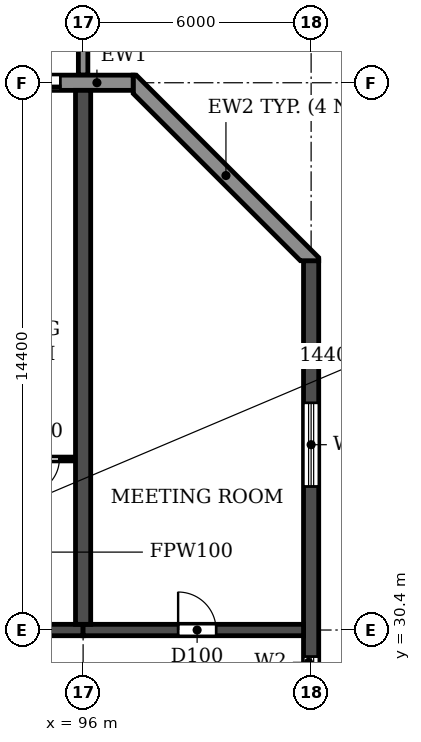
"""IFC4 building model, lengths in metres.
Left out: names, types, materials, properties, quantities, classifications, styles, units other than length and angle.
Written with IfcOpenShell. Run it as: python <this file> out.ifc"""

import sys

from ifc_helpers import new_model, si_unit, direction, frame, frame_2d, origin, place, context, subcontext, project, spatial, polyline, rectangle, outline, extrude, source, transform, mapped, element, fill, save


model = new_model("IFC4")
c1 = context("Model", 3, precision=1e-05, world=origin(), true_north=direction((0.0, 1.0)))
c2 = subcontext(c1, "Body", "Model", "MODEL_VIEW")
j1 = project(units=[si_unit("LENGTHUNIT", "METRE"), si_unit("PLANEANGLEUNIT", "RADIAN")], contexts=[c1])
p1 = place(None, origin())
s1 = spatial("IfcSite", under=j1, at=p1, CompositionType="ELEMENT")
p2 = place(p1, origin())
s2 = spatial("IfcBuilding", under=s1, at=p2, CompositionType="ELEMENT")
p3 = place(p2, frame((0.0, 0.0, 43.2)))
s3 = spatial("IfcBuildingStorey", under=s2, at=p3, CompositionType="ELEMENT", Elevation=43.2)
p4 = place(p3, frame((96.0, 30.55, 0.0), z_axis=(0.0, 0.0, 1.0), x_axis=(0.0, 1.0, 0.0)))
e1 = element("IfcWall", 1, at=p4, inside=s3, PredefinedType="SHEAR", context=c2, shape_type="SweptSolid", body=[
    extrude(rectangle(XDim=14.05, YDim=0.4, at=frame_2d((7.025, 0.0))), origin(), (0.0, 0.0, 1.0), 3.05),
])
p5 = place(p3, frame((102.0, 4.683, 0.0), z_axis=(0.0, 0.0, 1.0), x_axis=(0.0, 1.0, 0.0)))
e2 = element("IfcWall", 2, at=p5, inside=s3, PredefinedType="SHEAR", context=c2, shape_type="SweptSolid", body=[
    extrude(rectangle(XDim=35.434, YDim=0.4, at=frame_2d((17.717, 0.0))), origin(), (0.0, 0.0, 1.0), 3.05),
])
p6 = place(p5, frame((15.917, 0.0, 0.9)))
e3 = element("IfcOpeningElement", 3, at=p6, cuts=e2, PredefinedType="OPENING", context=c2, shape_type="SweptSolid", body=[
    extrude(rectangle(XDim=1.2, YDim=1.5, at=frame_2d((0.6, 0.75))), frame((0.0, 0.21, 0.0), z_axis=(0.0, -1.0, 0.0), x_axis=(1.0, 0.0, 0.0)), (0.0, 0.0, 1.0), 0.42),
])
p7 = place(p5, frame((23.817, 0.0, 0.9)))
e4 = element("IfcOpeningElement", 4, at=p7, cuts=e2, PredefinedType="OPENING", context=c2, shape_type="SweptSolid", body=[
    extrude(rectangle(XDim=1.2, YDim=1.5, at=frame_2d((0.6, 0.75))), frame((0.0, 0.21, 0.0), z_axis=(0.0, -1.0, 0.0), x_axis=(1.0, 0.0, 0.0)), (0.0, 0.0, 1.0), 0.42),
])
p8 = place(p5, frame((8.017, 0.0, 0.9)))
e5 = element("IfcOpeningElement", 5, at=p8, cuts=e2, PredefinedType="OPENING", context=c2, shape_type="SweptSolid", body=[
    extrude(rectangle(XDim=1.2, YDim=1.5, at=frame_2d((0.6, 0.75))), frame((0.0, 0.21, 0.0), z_axis=(0.0, -1.0, 0.0), x_axis=(1.0, 0.0, 0.0)), (0.0, 0.0, 1.0), 0.42),
])
p9 = place(p5, frame((29.493, 0.0, 0.6)))
e6 = element("IfcOpeningElement", 6, at=p9, cuts=e2, PredefinedType="OPENING", context=c2, shape_type="SweptSolid", body=[
    extrude(rectangle(XDim=2.2, YDim=1.8, at=frame_2d((1.1, 0.9))), frame((0.0, 0.21, 0.0), z_axis=(0.0, -1.0, 0.0), x_axis=(1.0, 0.0, 0.0)), (0.0, 0.0, 1.0), 0.42),
])
p10 = place(p5, frame((2.541, 0.0, 0.6)))
e7 = element("IfcOpeningElement", 7, at=p10, cuts=e2, PredefinedType="OPENING", context=c2, shape_type="SweptSolid", body=[
    extrude(rectangle(XDim=2.2, YDim=1.8, at=frame_2d((1.1, 0.9))), frame((0.0, 0.21, 0.0), z_axis=(0.0, -1.0, 0.0), x_axis=(1.0, 0.0, 0.0)), (0.0, 0.0, 1.0), 0.42),
])
p11 = place(p3, frame((90.0, 30.4, 0.0), z_axis=(0.0, 0.0, 1.0), x_axis=(1.0, 0.0, 0.0)))
e8 = element("IfcWall", 8, at=p11, inside=s3, PredefinedType="SHEAR", context=c2, shape_type="SweptSolid", body=[
    extrude(rectangle(XDim=6.0, YDim=0.3, at=frame_2d((3.0, 0.0))), origin(), (0.0, 0.0, 1.0), 2.45),
])
p12 = place(p11, frame((2.45, 0.0, 0.0)))
e9 = element("IfcOpeningElement", 9, at=p12, cuts=e8, PredefinedType="OPENING", context=c2, shape_type="SweptSolid", body=[
    extrude(rectangle(XDim=1.0, YDim=2.1, at=frame_2d((0.5, 1.05))), frame((0.0, 0.16, 0.0), z_axis=(0.0, -1.0, 0.0), x_axis=(1.0, 0.0, 0.0)), (0.0, 0.0, 1.0), 0.32),
])
p13 = place(p3, frame((96.0, 30.4, 0.0), z_axis=(0.0, 0.0, 1.0), x_axis=(1.0, 0.0, 0.0)))
e10 = element("IfcWall", 10, at=p13, inside=s3, PredefinedType="SHEAR", context=c2, shape_type="SweptSolid", body=[
    extrude(rectangle(XDim=5.8, YDim=0.3, at=frame_2d((2.9, 0.0))), origin(), (0.0, 0.0, 1.0), 2.45),
])
p14 = place(p13, frame((2.5, 0.0, 0.0)))
e11 = element("IfcOpeningElement", 11, at=p14, cuts=e10, PredefinedType="OPENING", context=c2, shape_type="SweptSolid", body=[
    extrude(rectangle(XDim=1.0, YDim=2.1, at=frame_2d((0.5, 1.05))), frame((0.0, 0.16, 0.0), z_axis=(0.0, -1.0, 0.0), x_axis=(1.0, 0.0, 0.0)), (0.0, 0.0, 1.0), 0.32),
])
p15 = place(p3, origin())
e12 = element("IfcWall", 12, at=p15, inside=s3, PredefinedType="STANDARD", context=c2, shape_type="SweptSolid", body=[
    extrude(outline(polyline([(102.2, 40.117), (102.2, 40.2), (97.4, 45.0), (97.317, 45.0), (97.317, 44.517), (101.717, 40.117), (102.2, 40.117)])), origin(), (0.0, 0.0, 1.0), 3.05),
])
p16 = place(p3, frame((97.317, 44.8, 0.0), z_axis=(0.0, 0.0, 1.0), x_axis=(-1.0, 0.0, 0.0)))
e13 = element("IfcWall", 13, at=p16, inside=s3, PredefinedType="STANDARD", context=c2, shape_type="SweptSolid", body=[
    extrude(rectangle(XDim=92.634, YDim=0.4, at=frame_2d((46.317, 0.0))), origin(), (0.0, 0.0, 1.0), 3.05),
])
p17 = place(p16, frame((88.917, 0.0, 0.0)))
e14 = element("IfcOpeningElement", 14, at=p17, cuts=e13, PredefinedType="OPENING", context=c2, shape_type="SweptSolid", body=[
    extrude(rectangle(XDim=1.8, YDim=2.4, at=frame_2d((0.9, 1.2))), frame((0.0, 0.21, 0.0), z_axis=(0.0, -1.0, 0.0), x_axis=(1.0, 0.0, 0.0)), (0.0, 0.0, 1.0), 0.42),
])
p18 = place(p16, frame((85.717, 0.0, 0.9)))
e15 = element("IfcOpeningElement", 15, at=p18, cuts=e13, PredefinedType="OPENING", context=c2, shape_type="SweptSolid", body=[
    extrude(rectangle(XDim=2.2, YDim=1.5, at=frame_2d((1.1, 0.75))), frame((0.0, 0.21, 0.0), z_axis=(0.0, -1.0, 0.0), x_axis=(1.0, 0.0, 0.0)), (0.0, 0.0, 1.0), 0.42),
])
p19 = place(p16, frame((82.717, 0.0, 0.9)))
e16 = element("IfcOpeningElement", 16, at=p19, cuts=e13, PredefinedType="OPENING", context=c2, shape_type="SweptSolid", body=[
    extrude(rectangle(XDim=2.2, YDim=1.5, at=frame_2d((1.1, 0.75))), frame((0.0, 0.21, 0.0), z_axis=(0.0, -1.0, 0.0), x_axis=(1.0, 0.0, 0.0)), (0.0, 0.0, 1.0), 0.42),
])
p20 = place(p16, frame((79.717, 0.0, 0.9)))
e17 = element("IfcOpeningElement", 17, at=p20, cuts=e13, PredefinedType="OPENING", context=c2, shape_type="SweptSolid", body=[
    extrude(rectangle(XDim=2.2, YDim=1.5, at=frame_2d((1.1, 0.75))), frame((0.0, 0.21, 0.0), z_axis=(0.0, -1.0, 0.0), x_axis=(1.0, 0.0, 0.0)), (0.0, 0.0, 1.0), 0.42),
])
p21 = place(p16, frame((76.717, 0.0, 0.9)))
e18 = element("IfcOpeningElement", 18, at=p21, cuts=e13, PredefinedType="OPENING", context=c2, shape_type="SweptSolid", body=[
    extrude(rectangle(XDim=2.2, YDim=1.5, at=frame_2d((1.1, 0.75))), frame((0.0, 0.21, 0.0), z_axis=(0.0, -1.0, 0.0), x_axis=(1.0, 0.0, 0.0)), (0.0, 0.0, 1.0), 0.42),
])
p22 = place(p16, frame((73.917, 0.0, 0.0)))
e19 = element("IfcOpeningElement", 19, at=p22, cuts=e13, PredefinedType="OPENING", context=c2, shape_type="SweptSolid", body=[
    extrude(rectangle(XDim=1.8, YDim=2.4, at=frame_2d((0.9, 1.2))), frame((0.0, 0.21, 0.0), z_axis=(0.0, -1.0, 0.0), x_axis=(1.0, 0.0, 0.0)), (0.0, 0.0, 1.0), 0.42),
])
p23 = place(p16, frame((70.717, 0.0, 0.9)))
e20 = element("IfcOpeningElement", 20, at=p23, cuts=e13, PredefinedType="OPENING", context=c2, shape_type="SweptSolid", body=[
    extrude(rectangle(XDim=2.2, YDim=1.5, at=frame_2d((1.1, 0.75))), frame((0.0, 0.21, 0.0), z_axis=(0.0, -1.0, 0.0), x_axis=(1.0, 0.0, 0.0)), (0.0, 0.0, 1.0), 0.42),
])
p24 = place(p16, frame((67.717, 0.0, 0.9)))
e21 = element("IfcOpeningElement", 21, at=p24, cuts=e13, PredefinedType="OPENING", context=c2, shape_type="SweptSolid", body=[
    extrude(rectangle(XDim=2.2, YDim=1.5, at=frame_2d((1.1, 0.75))), frame((0.0, 0.21, 0.0), z_axis=(0.0, -1.0, 0.0), x_axis=(1.0, 0.0, 0.0)), (0.0, 0.0, 1.0), 0.42),
])
p25 = place(p16, frame((64.717, 0.0, 0.9)))
e22 = element("IfcOpeningElement", 22, at=p25, cuts=e13, PredefinedType="OPENING", context=c2, shape_type="SweptSolid", body=[
    extrude(rectangle(XDim=2.2, YDim=1.5, at=frame_2d((1.1, 0.75))), frame((0.0, 0.21, 0.0), z_axis=(0.0, -1.0, 0.0), x_axis=(1.0, 0.0, 0.0)), (0.0, 0.0, 1.0), 0.42),
])
p26 = place(p16, frame((61.917, 0.0, 0.0)))
e23 = element("IfcOpeningElement", 23, at=p26, cuts=e13, PredefinedType="OPENING", context=c2, shape_type="SweptSolid", body=[
    extrude(rectangle(XDim=1.8, YDim=2.4, at=frame_2d((0.9, 1.2))), frame((0.0, 0.21, 0.0), z_axis=(0.0, -1.0, 0.0), x_axis=(1.0, 0.0, 0.0)), (0.0, 0.0, 1.0), 0.42),
])
p27 = place(p16, frame((58.717, 0.0, 0.9)))
e24 = element("IfcOpeningElement", 24, at=p27, cuts=e13, PredefinedType="OPENING", context=c2, shape_type="SweptSolid", body=[
    extrude(rectangle(XDim=2.2, YDim=1.5, at=frame_2d((1.1, 0.75))), frame((0.0, 0.21, 0.0), z_axis=(0.0, -1.0, 0.0), x_axis=(1.0, 0.0, 0.0)), (0.0, 0.0, 1.0), 0.42),
])
p28 = place(p16, frame((55.717, 0.0, 0.9)))
e25 = element("IfcOpeningElement", 25, at=p28, cuts=e13, PredefinedType="OPENING", context=c2, shape_type="SweptSolid", body=[
    extrude(rectangle(XDim=2.2, YDim=1.5, at=frame_2d((1.1, 0.75))), frame((0.0, 0.21, 0.0), z_axis=(0.0, -1.0, 0.0), x_axis=(1.0, 0.0, 0.0)), (0.0, 0.0, 1.0), 0.42),
])
p29 = place(p16, frame((52.717, 0.0, 0.9)))
e26 = element("IfcOpeningElement", 26, at=p29, cuts=e13, PredefinedType="OPENING", context=c2, shape_type="SweptSolid", body=[
    extrude(rectangle(XDim=2.2, YDim=1.5, at=frame_2d((1.1, 0.75))), frame((0.0, 0.21, 0.0), z_axis=(0.0, -1.0, 0.0), x_axis=(1.0, 0.0, 0.0)), (0.0, 0.0, 1.0), 0.42),
])
p30 = place(p16, frame((49.917, 0.0, 0.0)))
e27 = element("IfcOpeningElement", 27, at=p30, cuts=e13, PredefinedType="OPENING", context=c2, shape_type="SweptSolid", body=[
    extrude(rectangle(XDim=1.8, YDim=2.4, at=frame_2d((0.9, 1.2))), frame((0.0, 0.21, 0.0), z_axis=(0.0, -1.0, 0.0), x_axis=(1.0, 0.0, 0.0)), (0.0, 0.0, 1.0), 0.42),
])
p31 = place(p16, frame((46.717, 0.0, 0.9)))
e28 = element("IfcOpeningElement", 28, at=p31, cuts=e13, PredefinedType="OPENING", context=c2, shape_type="SweptSolid", body=[
    extrude(rectangle(XDim=2.2, YDim=1.5, at=frame_2d((1.1, 0.75))), frame((0.0, 0.21, 0.0), z_axis=(0.0, -1.0, 0.0), x_axis=(1.0, 0.0, 0.0)), (0.0, 0.0, 1.0), 0.42),
])
p32 = place(p16, frame((43.717, 0.0, 0.9)))
e29 = element("IfcOpeningElement", 29, at=p32, cuts=e13, PredefinedType="OPENING", context=c2, shape_type="SweptSolid", body=[
    extrude(rectangle(XDim=2.2, YDim=1.5, at=frame_2d((1.1, 0.75))), frame((0.0, 0.21, 0.0), z_axis=(0.0, -1.0, 0.0), x_axis=(1.0, 0.0, 0.0)), (0.0, 0.0, 1.0), 0.42),
])
p33 = place(p16, frame((40.717, 0.0, 0.9)))
e30 = element("IfcOpeningElement", 30, at=p33, cuts=e13, PredefinedType="OPENING", context=c2, shape_type="SweptSolid", body=[
    extrude(rectangle(XDim=2.2, YDim=1.5, at=frame_2d((1.1, 0.75))), frame((0.0, 0.21, 0.0), z_axis=(0.0, -1.0, 0.0), x_axis=(1.0, 0.0, 0.0)), (0.0, 0.0, 1.0), 0.42),
])
p34 = place(p16, frame((37.917, 0.0, 0.0)))
e31 = element("IfcOpeningElement", 31, at=p34, cuts=e13, PredefinedType="OPENING", context=c2, shape_type="SweptSolid", body=[
    extrude(rectangle(XDim=1.8, YDim=2.4, at=frame_2d((0.9, 1.2))), frame((0.0, 0.21, 0.0), z_axis=(0.0, -1.0, 0.0), x_axis=(1.0, 0.0, 0.0)), (0.0, 0.0, 1.0), 0.42),
])
p35 = place(p16, frame((34.717, 0.0, 0.9)))
e32 = element("IfcOpeningElement", 32, at=p35, cuts=e13, PredefinedType="OPENING", context=c2, shape_type="SweptSolid", body=[
    extrude(rectangle(XDim=2.2, YDim=1.5, at=frame_2d((1.1, 0.75))), frame((0.0, 0.21, 0.0), z_axis=(0.0, -1.0, 0.0), x_axis=(1.0, 0.0, 0.0)), (0.0, 0.0, 1.0), 0.42),
])
p36 = place(p16, frame((31.717, 0.0, 0.9)))
e33 = element("IfcOpeningElement", 33, at=p36, cuts=e13, PredefinedType="OPENING", context=c2, shape_type="SweptSolid", body=[
    extrude(rectangle(XDim=2.2, YDim=1.5, at=frame_2d((1.1, 0.75))), frame((0.0, 0.21, 0.0), z_axis=(0.0, -1.0, 0.0), x_axis=(1.0, 0.0, 0.0)), (0.0, 0.0, 1.0), 0.42),
])
p37 = place(p16, frame((28.717, 0.0, 0.9)))
e34 = element("IfcOpeningElement", 34, at=p37, cuts=e13, PredefinedType="OPENING", context=c2, shape_type="SweptSolid", body=[
    extrude(rectangle(XDim=2.2, YDim=1.5, at=frame_2d((1.1, 0.75))), frame((0.0, 0.21, 0.0), z_axis=(0.0, -1.0, 0.0), x_axis=(1.0, 0.0, 0.0)), (0.0, 0.0, 1.0), 0.42),
])
p38 = place(p16, frame((25.917, 0.0, 0.0)))
e35 = element("IfcOpeningElement", 35, at=p38, cuts=e13, PredefinedType="OPENING", context=c2, shape_type="SweptSolid", body=[
    extrude(rectangle(XDim=1.8, YDim=2.4, at=frame_2d((0.9, 1.2))), frame((0.0, 0.21, 0.0), z_axis=(0.0, -1.0, 0.0), x_axis=(1.0, 0.0, 0.0)), (0.0, 0.0, 1.0), 0.42),
])
p39 = place(p16, frame((22.917, 0.0, 0.0)))
e36 = element("IfcOpeningElement", 36, at=p39, cuts=e13, PredefinedType="OPENING", context=c2, shape_type="SweptSolid", body=[
    extrude(rectangle(XDim=1.8, YDim=2.4, at=frame_2d((0.9, 1.2))), frame((0.0, 0.21, 0.0), z_axis=(0.0, -1.0, 0.0), x_axis=(1.0, 0.0, 0.0)), (0.0, 0.0, 1.0), 0.42),
])
p40 = place(p16, frame((19.717, 0.0, 0.9)))
e37 = element("IfcOpeningElement", 37, at=p40, cuts=e13, PredefinedType="OPENING", context=c2, shape_type="SweptSolid", body=[
    extrude(rectangle(XDim=2.2, YDim=1.5, at=frame_2d((1.1, 0.75))), frame((0.0, 0.21, 0.0), z_axis=(0.0, -1.0, 0.0), x_axis=(1.0, 0.0, 0.0)), (0.0, 0.0, 1.0), 0.42),
])
p41 = place(p16, frame((16.717, 0.0, 0.9)))
e38 = element("IfcOpeningElement", 38, at=p41, cuts=e13, PredefinedType="OPENING", context=c2, shape_type="SweptSolid", body=[
    extrude(rectangle(XDim=2.2, YDim=1.5, at=frame_2d((1.1, 0.75))), frame((0.0, 0.21, 0.0), z_axis=(0.0, -1.0, 0.0), x_axis=(1.0, 0.0, 0.0)), (0.0, 0.0, 1.0), 0.42),
])
p42 = place(p16, frame((13.717, 0.0, 0.9)))
e39 = element("IfcOpeningElement", 39, at=p42, cuts=e13, PredefinedType="OPENING", context=c2, shape_type="SweptSolid", body=[
    extrude(rectangle(XDim=2.2, YDim=1.5, at=frame_2d((1.1, 0.75))), frame((0.0, 0.21, 0.0), z_axis=(0.0, -1.0, 0.0), x_axis=(1.0, 0.0, 0.0)), (0.0, 0.0, 1.0), 0.42),
])
p43 = place(p16, frame((10.717, 0.0, 0.9)))
e40 = element("IfcOpeningElement", 40, at=p43, cuts=e13, PredefinedType="OPENING", context=c2, shape_type="SweptSolid", body=[
    extrude(rectangle(XDim=2.2, YDim=1.5, at=frame_2d((1.1, 0.75))), frame((0.0, 0.21, 0.0), z_axis=(0.0, -1.0, 0.0), x_axis=(1.0, 0.0, 0.0)), (0.0, 0.0, 1.0), 0.42),
])
p44 = place(p16, frame((7.917, 0.0, 0.0)))
e41 = element("IfcOpeningElement", 41, at=p44, cuts=e13, PredefinedType="OPENING", context=c2, shape_type="SweptSolid", body=[
    extrude(rectangle(XDim=1.8, YDim=2.4, at=frame_2d((0.9, 1.2))), frame((0.0, 0.21, 0.0), z_axis=(0.0, -1.0, 0.0), x_axis=(1.0, 0.0, 0.0)), (0.0, 0.0, 1.0), 0.42),
])
p45 = place(p16, frame((4.717, 0.0, 0.9)))
e42 = element("IfcOpeningElement", 42, at=p45, cuts=e13, PredefinedType="OPENING", context=c2, shape_type="SweptSolid", body=[
    extrude(rectangle(XDim=2.2, YDim=1.5, at=frame_2d((1.1, 0.75))), frame((0.0, 0.21, 0.0), z_axis=(0.0, -1.0, 0.0), x_axis=(1.0, 0.0, 0.0)), (0.0, 0.0, 1.0), 0.42),
])
p46 = place(p16, frame((1.917, 0.0, 0.0)))
e43 = element("IfcOpeningElement", 43, at=p46, cuts=e13, PredefinedType="OPENING", context=c2, shape_type="SweptSolid", body=[
    extrude(rectangle(XDim=1.8, YDim=2.4, at=frame_2d((0.9, 1.2))), frame((0.0, 0.21, 0.0), z_axis=(0.0, -1.0, 0.0), x_axis=(1.0, 0.0, 0.0)), (0.0, 0.0, 1.0), 0.42),
])
m1 = source(origin(), c2, "Body", "SweptSolid", [
    extrude(outline(polyline([(0.0, 0.0), (0.25, 0.0), (0.25, 3.1), (0.0, 3.1), (0.0, 0.0)])), origin(), (0.0, 0.0, 1.0), 3.1),
])
p47 = place(p3, frame((95.875, 45.0, 0.0)))
e44 = element("IfcWall", 44, at=p47, inside=s3, PredefinedType="STANDARD", context=c2, shape_type="MappedRepresentation", body=[
    mapped(m1, transform((0.0, 0.0, 0.0))),
])
p48 = place(p3, frame((93.8, 34.9, 0.0), z_axis=(0.0, 0.0, 1.0), x_axis=(1.0, 0.0, 0.0)))
e45 = element("IfcWall", 45, at=p48, inside=s3, PredefinedType="PARTITIONING", context=c2, shape_type="SweptSolid", body=[
    extrude(rectangle(XDim=1.99, YDim=0.1, at=frame_2d((0.995, 0.0))), origin(), (0.0, 0.0, 1.0), 3.05),
])
p49 = place(p48, frame((0.675, 0.0, 0.0)))
e46 = element("IfcOpeningElement", 46, at=p49, cuts=e45, PredefinedType="OPENING", context=c2, shape_type="SweptSolid", body=[
    extrude(rectangle(XDim=0.9, YDim=2.1, at=frame_2d((0.45, 1.05))), frame((0.0, 0.06, 0.0), z_axis=(0.0, -1.0, 0.0), x_axis=(1.0, 0.0, 0.0)), (0.0, 0.0, 1.0), 0.12),
])
p50 = place(p7, origin())
e47 = element("IfcWindow", 47, at=p50, inside=s3, PartitioningType="SINGLE_PANEL", PredefinedType="WINDOW", context=c2, shape_type="SweptSolid", body=[
    extrude(rectangle(XDim=1.2, YDim=1.5, at=frame_2d((0.6, 0.75))), frame((0.0, 0.03, 0.0), z_axis=(0.0, -1.0, 0.0), x_axis=(1.0, 0.0, 0.0)), (0.0, 0.0, 1.0), 0.06),
])
fill(e4, e47)
p51 = place(p9, origin())
e48 = element("IfcWindow", 48, at=p51, inside=s3, PartitioningType="DOUBLE_PANEL_HORIZONTAL", PredefinedType="WINDOW", context=c2, shape_type="SweptSolid", body=[
    extrude(rectangle(XDim=2.2, YDim=1.8, at=frame_2d((1.1, 0.9))), frame((0.0, 0.03, 0.0), z_axis=(0.0, -1.0, 0.0), x_axis=(1.0, 0.0, 0.0)), (0.0, 0.0, 1.0), 0.06),
])
fill(e6, e48)
p52 = place(p46, origin())
e49 = element("IfcDoor", 49, at=p52, inside=s3, OperationType="DOUBLE_DOOR_SLIDING", PredefinedType="DOOR", context=c2, shape_type="SweptSolid", body=[
    extrude(rectangle(XDim=1.8, YDim=2.4, at=frame_2d((0.9, 1.2))), frame((0.0, 0.025, 0.0), z_axis=(0.0, -1.0, 0.0), x_axis=(1.0, 0.0, 0.0)), (0.0, 0.0, 1.0), 0.05),
])
fill(e43, e49)
p53 = place(p49, frame((0.9, 0.0, 0.0), z_axis=(0.0, 0.0, 1.0), x_axis=(-1.0, 0.0, 0.0)))
e50 = element("IfcDoor", 50, at=p53, inside=s3, OperationType="SINGLE_SWING_RIGHT", PredefinedType="DOOR", context=c2, shape_type="SweptSolid", body=[
    extrude(rectangle(XDim=0.9, YDim=2.1, at=frame_2d((0.45, 1.05))), frame((0.0, 0.025, 0.0), z_axis=(0.0, -1.0, 0.0), x_axis=(1.0, 0.0, 0.0)), (0.0, 0.0, 1.0), 0.05),
])
fill(e46, e50)
p54 = place(p14, origin())
e51 = element("IfcDoor", 51, at=p54, inside=s3, OperationType="SINGLE_SWING_LEFT", PredefinedType="DOOR", context=c2, shape_type="SweptSolid", body=[
    extrude(rectangle(XDim=1.0, YDim=2.1, at=frame_2d((0.5, 1.05))), frame((0.0, 0.025, 0.0), z_axis=(0.0, -1.0, 0.0), x_axis=(1.0, 0.0, 0.0)), (0.0, 0.0, 1.0), 0.05),
])
fill(e11, e51)
save(model, sys.argv[1])
